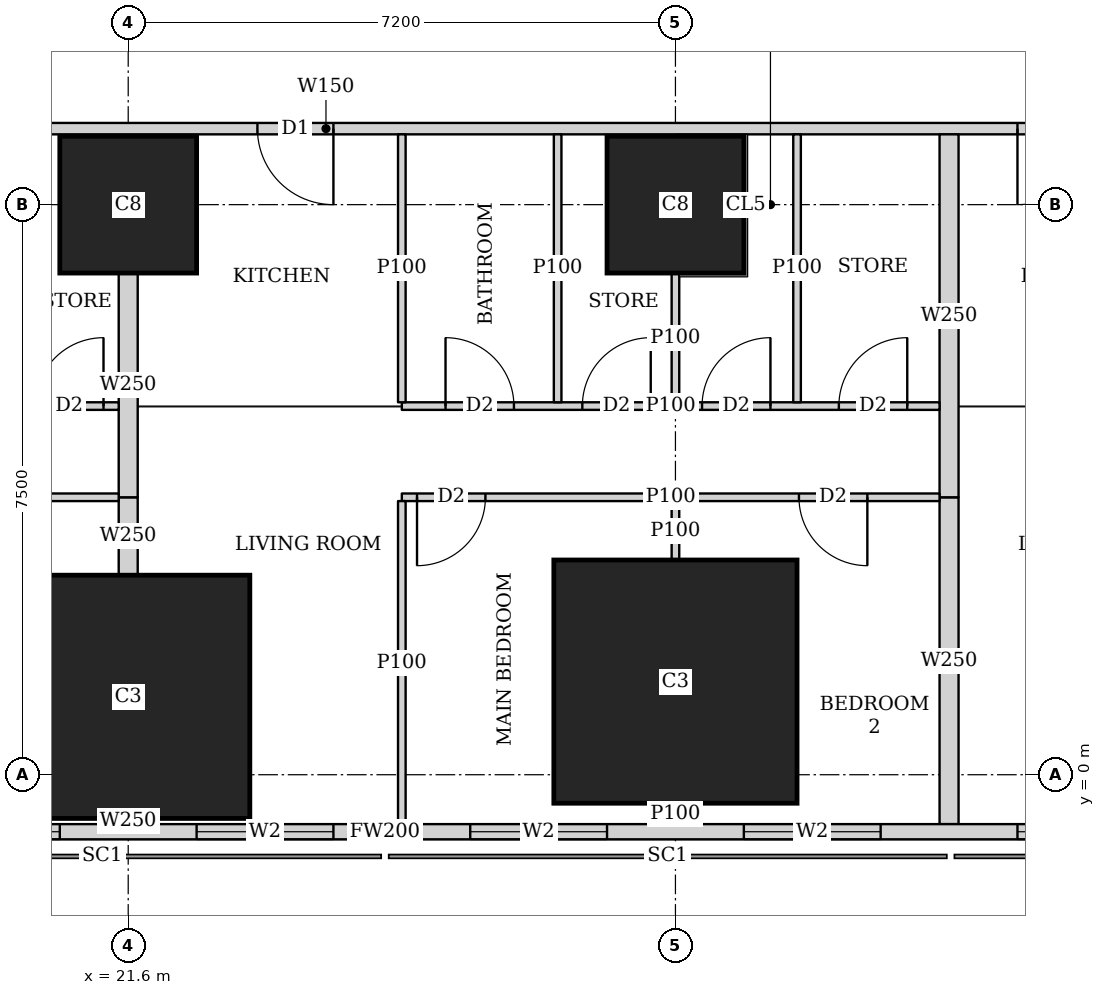
"""IFC4 building model, lengths in metres.
Left out: names, types, materials, properties, quantities, classifications, styles, units other than length and angle.
Written with IfcOpenShell. Run it as: python <this file> out.ifc"""

import sys

from ifc_helpers import new_model, si_unit, direction, frame, frame_2d, origin, origin_2d, place, context, subcontext, project, spatial, rectangle, extrude, element, fill, save


model = new_model("IFC4")
c1 = context("Model", 3, precision=1e-05, world=origin(), true_north=direction((0.0, 1.0)))
c2 = subcontext(c1, "Body", "Model", "MODEL_VIEW")
j1 = project(units=[si_unit("LENGTHUNIT", "METRE"), si_unit("PLANEANGLEUNIT", "RADIAN")], contexts=[c1])
p1 = place(None, origin())
s1 = spatial("IfcSite", under=j1, at=p1, CompositionType="ELEMENT")
p2 = place(p1, origin())
s2 = spatial("IfcBuilding", under=s1, at=p2, CompositionType="ELEMENT")
p3 = place(p2, frame((0.0, 0.0, 20.0)))
s3 = spatial("IfcBuildingStorey", under=s2, at=p3, CompositionType="ELEMENT", Elevation=20.0)
p4 = place(p3, frame((21.6, 1.025, -0.3), z_axis=(0.0, 0.0, 1.0), x_axis=(1.0, 0.0, 0.0)))
e1 = element("IfcColumn", 1, at=p4, inside=s3, PredefinedType="COLUMN", context=c2, shape_type="SweptSolid", body=[
    extrude(rectangle(XDim=3.2, YDim=3.2, at=origin_2d()), origin(), (0.0, 0.0, 1.0), 4.05),
])
p5 = place(p3, frame((28.8, 1.225, 0.0), z_axis=(0.0, 0.0, 1.0), x_axis=(1.0, 0.0, 0.0)))
e2 = element("IfcColumn", 2, at=p5, inside=s3, PredefinedType="COLUMN", context=c2, shape_type="SweptSolid", body=[
    extrude(rectangle(XDim=3.2, YDim=3.2, at=origin_2d()), origin(), (0.0, 0.0, 1.0), 3.75),
])
for number, where, z_axis, x_axis in (
    (3, (21.6, 7.5, 0.0), (0.0, 0.0, 1.0), (1.0, 0.0, 0.0)),
    (4, (28.8, 7.5, 0.0), (0.0, 0.0, 1.0), (1.0, 0.0, 0.0)),
):
    element("IfcColumn", number, at=place(p3, frame(where, z_axis=z_axis, x_axis=x_axis)), inside=s3, PredefinedType="COLUMN", context=c2, shape_type="SweptSolid", body=[
        extrude(rectangle(XDim=1.8, YDim=1.8, at=origin_2d()), origin(), (0.0, 0.0, 1.0), 3.75),
    ])
p6 = place(p3, frame((2.163, -0.75, 0.0), z_axis=(0.0, 0.0, 1.0), x_axis=(1.0, 0.0, 0.0)))
e5 = element("IfcWall", 5, at=p6, inside=s3, PredefinedType="SOLIDWALL", context=c2, shape_type="SweptSolid", body=[
    extrude(rectangle(XDim=45.628, YDim=0.2, at=frame_2d((22.814, 0.0))), origin(), (0.0, 0.0, 1.0), 3.5),
])
p7 = place(p6, frame((9.537, 0.0, 0.9)))
e6 = element("IfcOpeningElement", 6, at=p7, cuts=e5, PredefinedType="OPENING", context=c2, shape_type="SweptSolid", body=[
    extrude(rectangle(XDim=1.8, YDim=1.5, at=frame_2d((0.9, 0.75))), frame((0.0, 0.11, 0.0), z_axis=(0.0, -1.0, 0.0), x_axis=(1.0, 0.0, 0.0)), (0.0, 0.0, 1.0), 0.22),
])
p8 = place(p6, frame((13.137, 0.0, 0.9)))
e7 = element("IfcOpeningElement", 7, at=p8, cuts=e5, PredefinedType="OPENING", context=c2, shape_type="SweptSolid", body=[
    extrude(rectangle(XDim=1.8, YDim=1.5, at=frame_2d((0.9, 0.75))), frame((0.0, 0.11, 0.0), z_axis=(0.0, -1.0, 0.0), x_axis=(1.0, 0.0, 0.0)), (0.0, 0.0, 1.0), 0.22),
])
p9 = place(p6, frame((16.737, 0.0, 0.9)))
e8 = element("IfcOpeningElement", 8, at=p9, cuts=e5, PredefinedType="OPENING", context=c2, shape_type="SweptSolid", body=[
    extrude(rectangle(XDim=1.8, YDim=1.5, at=frame_2d((0.9, 0.75))), frame((0.0, 0.11, 0.0), z_axis=(0.0, -1.0, 0.0), x_axis=(1.0, 0.0, 0.0)), (0.0, 0.0, 1.0), 0.22),
])
p10 = place(p6, frame((20.337, 0.0, 0.9)))
e9 = element("IfcOpeningElement", 9, at=p10, cuts=e5, PredefinedType="OPENING", context=c2, shape_type="SweptSolid", body=[
    extrude(rectangle(XDim=1.8, YDim=1.5, at=frame_2d((0.9, 0.75))), frame((0.0, 0.11, 0.0), z_axis=(0.0, -1.0, 0.0), x_axis=(1.0, 0.0, 0.0)), (0.0, 0.0, 1.0), 0.22),
])
p11 = place(p6, frame((23.937, 0.0, 0.9)))
e10 = element("IfcOpeningElement", 10, at=p11, cuts=e5, PredefinedType="OPENING", context=c2, shape_type="SweptSolid", body=[
    extrude(rectangle(XDim=1.8, YDim=1.5, at=frame_2d((0.9, 0.75))), frame((0.0, 0.11, 0.0), z_axis=(0.0, -1.0, 0.0), x_axis=(1.0, 0.0, 0.0)), (0.0, 0.0, 1.0), 0.22),
])
p12 = place(p6, frame((27.537, 0.0, 0.9)))
e11 = element("IfcOpeningElement", 11, at=p12, cuts=e5, PredefinedType="OPENING", context=c2, shape_type="SweptSolid", body=[
    extrude(rectangle(XDim=1.8, YDim=1.5, at=frame_2d((0.9, 0.75))), frame((0.0, 0.11, 0.0), z_axis=(0.0, -1.0, 0.0), x_axis=(1.0, 0.0, 0.0)), (0.0, 0.0, 1.0), 0.22),
])
p13 = place(p6, frame((31.137, 0.0, 0.9)))
e12 = element("IfcOpeningElement", 12, at=p13, cuts=e5, PredefinedType="OPENING", context=c2, shape_type="SweptSolid", body=[
    extrude(rectangle(XDim=1.8, YDim=1.5, at=frame_2d((0.9, 0.75))), frame((0.0, 0.11, 0.0), z_axis=(0.0, -1.0, 0.0), x_axis=(1.0, 0.0, 0.0)), (0.0, 0.0, 1.0), 0.22),
])
p14 = place(p6, frame((34.737, 0.0, 0.9)))
e13 = element("IfcOpeningElement", 13, at=p14, cuts=e5, PredefinedType="OPENING", context=c2, shape_type="SweptSolid", body=[
    extrude(rectangle(XDim=1.8, YDim=1.5, at=frame_2d((0.9, 0.75))), frame((0.0, 0.11, 0.0), z_axis=(0.0, -1.0, 0.0), x_axis=(1.0, 0.0, 0.0)), (0.0, 0.0, 1.0), 0.22),
])
p15 = place(p3, frame((40.054, 8.5, 0.0), z_axis=(0.0, 0.0, 1.0), x_axis=(-1.0, 0.0, 0.0)))
e14 = element("IfcWall", 14, at=p15, inside=s3, PredefinedType="SOLIDWALL", context=c2, shape_type="SweptSolid", body=[
    extrude(rectangle(XDim=31.704, YDim=0.15, at=frame_2d((15.852, 0.0))), origin(), (0.0, 0.0, 1.0), 3.5),
])
p16 = place(p15, frame((27.321, 0.0, 0.0)))
e15 = element("IfcOpeningElement", 15, at=p16, cuts=e14, PredefinedType="OPENING", context=c2, shape_type="SweptSolid", body=[
    extrude(rectangle(XDim=1.0, YDim=2.1, at=frame_2d((0.5, 1.05))), frame((0.0, 0.085, 0.0), z_axis=(0.0, -1.0, 0.0), x_axis=(1.0, 0.0, 0.0)), (0.0, 0.0, 1.0), 0.17),
])
p17 = place(p15, frame((23.054, 0.0, 0.0)))
e16 = element("IfcOpeningElement", 16, at=p17, cuts=e14, PredefinedType="OPENING", context=c2, shape_type="SweptSolid", body=[
    extrude(rectangle(XDim=1.0, YDim=2.1, at=frame_2d((0.5, 1.05))), frame((0.0, 0.085, 0.0), z_axis=(0.0, -1.0, 0.0), x_axis=(1.0, 0.0, 0.0)), (0.0, 0.0, 1.0), 0.17),
])
p18 = place(p15, frame((15.754, 0.0, 0.0)))
e17 = element("IfcOpeningElement", 17, at=p18, cuts=e14, PredefinedType="OPENING", context=c2, shape_type="SweptSolid", body=[
    extrude(rectangle(XDim=1.0, YDim=2.1, at=frame_2d((0.5, 1.05))), frame((0.0, 0.085, 0.0), z_axis=(0.0, -1.0, 0.0), x_axis=(1.0, 0.0, 0.0)), (0.0, 0.0, 1.0), 0.17),
])
p19 = place(p15, frame((5.754, 0.0, 0.0)))
e18 = element("IfcOpeningElement", 18, at=p19, cuts=e14, PredefinedType="OPENING", context=c2, shape_type="SweptSolid", body=[
    extrude(rectangle(XDim=1.0, YDim=2.1, at=frame_2d((0.5, 1.05))), frame((0.0, 0.085, 0.0), z_axis=(0.0, -1.0, 0.0), x_axis=(1.0, 0.0, 0.0)), (0.0, 0.0, 1.0), 0.17),
])
p20 = place(p3, frame((21.475, 3.65, 0.0), z_axis=(0.0, 0.0, 1.0), x_axis=(-1.0, 0.0, 0.0)))
e19 = element("IfcWall", 19, at=p20, inside=s3, PredefinedType="PARTITIONING", context=c2, shape_type="SweptSolid", body=[
    extrude(rectangle(XDim=3.475, YDim=0.1, at=frame_2d((1.738, 0.0))), origin(), (0.0, 0.0, 1.0), 3.5),
])
p21 = place(p20, frame((2.375, 0.0, 0.0)))
e20 = element("IfcOpeningElement", 20, at=p21, cuts=e19, PredefinedType="OPENING", context=c2, shape_type="SweptSolid", body=[
    extrude(rectangle(XDim=0.9, YDim=2.1, at=frame_2d((0.45, 1.05))), frame((0.0, 0.06, 0.0), z_axis=(0.0, -1.0, 0.0), x_axis=(1.0, 0.0, 0.0)), (0.0, 0.0, 1.0), 0.12),
])
p22 = place(p3, frame((21.475, 4.85, 0.0), z_axis=(0.0, 0.0, 1.0), x_axis=(-1.0, 0.0, 0.0)))
e21 = element("IfcWall", 21, at=p22, inside=s3, PredefinedType="PARTITIONING", context=c2, shape_type="SweptSolid", body=[
    extrude(rectangle(XDim=3.475, YDim=0.1, at=frame_2d((1.738, 0.0))), origin(), (0.0, 0.0, 1.0), 3.5),
])
p23 = place(p22, frame((2.0, 0.0, 0.0)))
e22 = element("IfcOpeningElement", 22, at=p23, cuts=e21, PredefinedType="OPENING", context=c2, shape_type="SweptSolid", body=[
    extrude(rectangle(XDim=0.9, YDim=2.1, at=frame_2d((0.45, 1.05))), frame((0.0, 0.06, 0.0), z_axis=(0.0, -1.0, 0.0), x_axis=(1.0, 0.0, 0.0)), (0.0, 0.0, 1.0), 0.12),
])
p24 = place(p22, frame((0.2, 0.0, 0.0)))
e23 = element("IfcOpeningElement", 23, at=p24, cuts=e21, PredefinedType="OPENING", context=c2, shape_type="SweptSolid", body=[
    extrude(rectangle(XDim=0.9, YDim=2.1, at=frame_2d((0.45, 1.05))), frame((0.0, 0.06, 0.0), z_axis=(0.0, -1.0, 0.0), x_axis=(1.0, 0.0, 0.0)), (0.0, 0.0, 1.0), 0.12),
])
p25 = place(p3, frame((32.275, 3.65, 0.0), z_axis=(0.0, 0.0, 1.0), x_axis=(-1.0, 0.0, 0.0)))
e24 = element("IfcWall", 24, at=p25, inside=s3, PredefinedType="PARTITIONING", context=c2, shape_type="SweptSolid", body=[
    extrude(rectangle(XDim=7.075, YDim=0.1, at=frame_2d((3.538, 0.0))), origin(), (0.0, 0.0, 1.0), 3.5),
])
p26 = place(p25, frame((5.975, 0.0, 0.0)))
e25 = element("IfcOpeningElement", 25, at=p26, cuts=e24, PredefinedType="OPENING", context=c2, shape_type="SweptSolid", body=[
    extrude(rectangle(XDim=0.9, YDim=2.1, at=frame_2d((0.45, 1.05))), frame((0.0, 0.06, 0.0), z_axis=(0.0, -1.0, 0.0), x_axis=(1.0, 0.0, 0.0)), (0.0, 0.0, 1.0), 0.12),
])
p27 = place(p25, frame((0.95, 0.0, 0.0)))
e26 = element("IfcOpeningElement", 26, at=p27, cuts=e24, PredefinedType="OPENING", context=c2, shape_type="SweptSolid", body=[
    extrude(rectangle(XDim=0.9, YDim=2.1, at=frame_2d((0.45, 1.05))), frame((0.0, 0.06, 0.0), z_axis=(0.0, -1.0, 0.0), x_axis=(1.0, 0.0, 0.0)), (0.0, 0.0, 1.0), 0.12),
])
p28 = place(p3, frame((32.275, 4.85, 0.0), z_axis=(0.0, 0.0, 1.0), x_axis=(-1.0, 0.0, 0.0)))
e27 = element("IfcWall", 27, at=p28, inside=s3, PredefinedType="PARTITIONING", context=c2, shape_type="SweptSolid", body=[
    extrude(rectangle(XDim=7.075, YDim=0.1, at=frame_2d((3.538, 0.0))), origin(), (0.0, 0.0, 1.0), 3.5),
])
p29 = place(p28, frame((5.6, 0.0, 0.0)))
e28 = element("IfcOpeningElement", 28, at=p29, cuts=e27, PredefinedType="OPENING", context=c2, shape_type="SweptSolid", body=[
    extrude(rectangle(XDim=0.9, YDim=2.1, at=frame_2d((0.45, 1.05))), frame((0.0, 0.06, 0.0), z_axis=(0.0, -1.0, 0.0), x_axis=(1.0, 0.0, 0.0)), (0.0, 0.0, 1.0), 0.12),
])
p30 = place(p28, frame((2.225, 0.0, 0.0)))
e29 = element("IfcOpeningElement", 29, at=p30, cuts=e27, PredefinedType="OPENING", context=c2, shape_type="SweptSolid", body=[
    extrude(rectangle(XDim=0.9, YDim=2.1, at=frame_2d((0.45, 1.05))), frame((0.0, 0.06, 0.0), z_axis=(0.0, -1.0, 0.0), x_axis=(1.0, 0.0, 0.0)), (0.0, 0.0, 1.0), 0.12),
])
p31 = place(p28, frame((3.8, 0.0, 0.0)))
e30 = element("IfcOpeningElement", 30, at=p31, cuts=e27, PredefinedType="OPENING", context=c2, shape_type="SweptSolid", body=[
    extrude(rectangle(XDim=0.9, YDim=2.1, at=frame_2d((0.45, 1.05))), frame((0.0, 0.06, 0.0), z_axis=(0.0, -1.0, 0.0), x_axis=(1.0, 0.0, 0.0)), (0.0, 0.0, 1.0), 0.12),
])
p32 = place(p28, frame((0.425, 0.0, 0.0)))
e31 = element("IfcOpeningElement", 31, at=p32, cuts=e27, PredefinedType="OPENING", context=c2, shape_type="SweptSolid", body=[
    extrude(rectangle(XDim=0.9, YDim=2.1, at=frame_2d((0.45, 1.05))), frame((0.0, 0.06, 0.0), z_axis=(0.0, -1.0, 0.0), x_axis=(1.0, 0.0, 0.0)), (0.0, 0.0, 1.0), 0.12),
])
p33 = place(p3, frame((25.2, -0.65, 0.0), z_axis=(0.0, 0.0, 1.0), x_axis=(0.0, 1.0, 0.0)))
e32 = element("IfcWall", 32, at=p33, inside=s3, PredefinedType="PARTITIONING", context=c2, shape_type="SweptSolid", body=[
    extrude(rectangle(XDim=4.25, YDim=0.1, at=frame_2d((2.125, 0.0))), origin(), (0.0, 0.0, 1.0), 2.05),
])
p34 = place(p3, frame((28.8, -0.65, 0.0), z_axis=(0.0, 0.0, 1.0), x_axis=(0.0, 1.0, 0.0)))
e33 = element("IfcWall", 33, at=p34, inside=s3, PredefinedType="PARTITIONING", context=c2, shape_type="SweptSolid", body=[
    extrude(rectangle(XDim=0.274, YDim=0.1, at=frame_2d((0.137, 0.0))), origin(), (0.0, 0.0, 1.0), 3.5),
])
p35 = place(p3, frame((28.8, 2.826, 0.0), z_axis=(0.0, 0.0, 1.0), x_axis=(0.0, 1.0, 0.0)))
e34 = element("IfcWall", 34, at=p35, inside=s3, PredefinedType="PARTITIONING", context=c2, shape_type="SweptSolid", body=[
    extrude(rectangle(XDim=0.774, YDim=0.1, at=frame_2d((0.387, 0.0))), origin(), (0.0, 0.0, 1.0), 3.5),
])
p36 = place(p3, frame((25.2, 4.9, 0.0), z_axis=(0.0, 0.0, 1.0), x_axis=(0.0, 1.0, 0.0)))
e35 = element("IfcWall", 35, at=p36, inside=s3, PredefinedType="PARTITIONING", context=c2, shape_type="SweptSolid", body=[
    extrude(rectangle(XDim=3.525, YDim=0.1, at=frame_2d((1.763, 0.0))), origin(), (0.0, 0.0, 1.0), 3.5),
])
p37 = place(p3, frame((28.8, 4.9, 0.0), z_axis=(0.0, 0.0, 1.0), x_axis=(0.0, 1.0, 0.0)))
e36 = element("IfcWall", 36, at=p37, inside=s3, PredefinedType="PARTITIONING", context=c2, shape_type="SweptSolid", body=[
    extrude(rectangle(XDim=1.699, YDim=0.1, at=frame_2d((0.85, 0.0))), origin(), (0.0, 0.0, 1.0), 3.5),
])
for number, where, z_axis, x_axis in (
    (37, (27.25, 4.9, 0.0), (0.0, 0.0, 1.0), (0.0, 1.0, 0.0)),
    (38, (30.4, 4.9, 0.0), (0.0, 0.0, 1.0), (0.0, 1.0, 0.0)),
):
    element("IfcWall", number, at=place(p3, frame(where, z_axis=z_axis, x_axis=x_axis)), inside=s3, PredefinedType="PARTITIONING", context=c2, shape_type="SweptSolid", body=[
        extrude(rectangle(XDim=3.525, YDim=0.1, at=frame_2d((1.763, 0.0))), origin(), (0.0, 0.0, 1.0), 3.5),
    ])
p38 = place(p3, frame((21.6, -0.65, 0.0), z_axis=(0.0, 0.0, 1.0), x_axis=(0.0, 1.0, 0.0)))
e39 = element("IfcWall", 39, at=p38, inside=s3, PredefinedType="SOLIDWALL", context=c2, shape_type="SweptSolid", body=[
    extrude(rectangle(XDim=0.074, YDim=0.25, at=frame_2d((0.037, 0.0))), origin(), (0.0, 0.0, 1.0), 2.05),
])
p39 = place(p3, frame((21.6, 2.626, 0.0), z_axis=(0.0, 0.0, 1.0), x_axis=(0.0, 1.0, 0.0)))
e40 = element("IfcWall", 40, at=p39, inside=s3, PredefinedType="SOLIDWALL", context=c2, shape_type="SweptSolid", body=[
    extrude(rectangle(XDim=1.024, YDim=0.25, at=frame_2d((0.512, 0.0))), origin(), (0.0, 0.0, 1.0), 2.05),
])
p40 = place(p3, frame((21.6, 3.65, 0.0), z_axis=(0.0, 0.0, 1.0), x_axis=(0.0, 1.0, 0.0)))
e41 = element("IfcWall", 41, at=p40, inside=s3, PredefinedType="SOLIDWALL", context=c2, shape_type="SweptSolid", body=[
    extrude(rectangle(XDim=2.949, YDim=0.25, at=frame_2d((1.475, 0.0))), origin(), (0.0, 0.0, 1.0), 3.5),
])
p41 = place(p3, frame((32.4, -0.65, 0.0), z_axis=(0.0, 0.0, 1.0), x_axis=(0.0, 1.0, 0.0)))
e42 = element("IfcWall", 42, at=p41, inside=s3, PredefinedType="SOLIDWALL", context=c2, shape_type="SweptSolid", body=[
    extrude(rectangle(XDim=4.3, YDim=0.25, at=frame_2d((2.15, 0.0))), origin(), (0.0, 0.0, 1.0), 2.05),
])
p42 = place(p3, frame((32.4, 3.65, 0.0), z_axis=(0.0, 0.0, 1.0), x_axis=(0.0, 1.0, 0.0)))
e43 = element("IfcWall", 43, at=p42, inside=s3, PredefinedType="SOLIDWALL", context=c2, shape_type="SweptSolid", body=[
    extrude(rectangle(XDim=4.775, YDim=0.25, at=frame_2d((2.388, 0.0))), origin(), (0.0, 0.0, 1.0), 3.5),
])
p43 = place(p9, origin())
e44 = element("IfcWindow", 44, at=p43, inside=s3, PartitioningType="SINGLE_PANEL", PredefinedType="WINDOW", context=c2, shape_type="SweptSolid", body=[
    extrude(rectangle(XDim=1.8, YDim=1.5, at=frame_2d((0.9, 0.75))), frame((0.0, 0.03, 0.0), z_axis=(0.0, -1.0, 0.0), x_axis=(1.0, 0.0, 0.0)), (0.0, 0.0, 1.0), 0.06),
])
fill(e8, e44)
p44 = place(p10, origin())
e45 = element("IfcWindow", 45, at=p44, inside=s3, PartitioningType="SINGLE_PANEL", PredefinedType="WINDOW", context=c2, shape_type="SweptSolid", body=[
    extrude(rectangle(XDim=1.8, YDim=1.5, at=frame_2d((0.9, 0.75))), frame((0.0, 0.03, 0.0), z_axis=(0.0, -1.0, 0.0), x_axis=(1.0, 0.0, 0.0)), (0.0, 0.0, 1.0), 0.06),
])
fill(e9, e45)
p45 = place(p11, origin())
e46 = element("IfcWindow", 46, at=p45, inside=s3, PartitioningType="SINGLE_PANEL", PredefinedType="WINDOW", context=c2, shape_type="SweptSolid", body=[
    extrude(rectangle(XDim=1.8, YDim=1.5, at=frame_2d((0.9, 0.75))), frame((0.0, 0.03, 0.0), z_axis=(0.0, -1.0, 0.0), x_axis=(1.0, 0.0, 0.0)), (0.0, 0.0, 1.0), 0.06),
])
fill(e10, e46)
p46 = place(p12, origin())
e47 = element("IfcWindow", 47, at=p46, inside=s3, PartitioningType="SINGLE_PANEL", PredefinedType="WINDOW", context=c2, shape_type="SweptSolid", body=[
    extrude(rectangle(XDim=1.8, YDim=1.5, at=frame_2d((0.9, 0.75))), frame((0.0, 0.03, 0.0), z_axis=(0.0, -1.0, 0.0), x_axis=(1.0, 0.0, 0.0)), (0.0, 0.0, 1.0), 0.06),
])
fill(e11, e47)
p47 = place(p13, origin())
e48 = element("IfcWindow", 48, at=p47, inside=s3, PartitioningType="SINGLE_PANEL", PredefinedType="WINDOW", context=c2, shape_type="SweptSolid", body=[
    extrude(rectangle(XDim=1.8, YDim=1.5, at=frame_2d((0.9, 0.75))), frame((0.0, 0.03, 0.0), z_axis=(0.0, -1.0, 0.0), x_axis=(1.0, 0.0, 0.0)), (0.0, 0.0, 1.0), 0.06),
])
fill(e12, e48)
p48 = place(p24, origin())
e49 = element("IfcDoor", 49, at=p48, inside=s3, OperationType="SINGLE_SWING_RIGHT", PredefinedType="DOOR", context=c2, shape_type="SweptSolid", body=[
    extrude(rectangle(XDim=0.9, YDim=2.1, at=frame_2d((0.45, 1.05))), frame((0.0, 0.025, 0.0), z_axis=(0.0, -1.0, 0.0), x_axis=(1.0, 0.0, 0.0)), (0.0, 0.0, 1.0), 0.05),
])
fill(e23, e49)
p49 = place(p26, origin())
e50 = element("IfcDoor", 50, at=p49, inside=s3, OperationType="SINGLE_SWING_RIGHT", PredefinedType="DOOR", context=c2, shape_type="SweptSolid", body=[
    extrude(rectangle(XDim=0.9, YDim=2.1, at=frame_2d((0.45, 1.05))), frame((0.0, 0.025, 0.0), z_axis=(0.0, -1.0, 0.0), x_axis=(1.0, 0.0, 0.0)), (0.0, 0.0, 1.0), 0.05),
])
fill(e25, e50)
p50 = place(p27, origin())
e51 = element("IfcDoor", 51, at=p50, inside=s3, OperationType="SINGLE_SWING_LEFT", PredefinedType="DOOR", context=c2, shape_type="SweptSolid", body=[
    extrude(rectangle(XDim=0.9, YDim=2.1, at=frame_2d((0.45, 1.05))), frame((0.0, 0.025, 0.0), z_axis=(0.0, -1.0, 0.0), x_axis=(1.0, 0.0, 0.0)), (0.0, 0.0, 1.0), 0.05),
])
fill(e26, e51)
p51 = place(p29, origin())
e52 = element("IfcDoor", 52, at=p51, inside=s3, OperationType="SINGLE_SWING_LEFT", PredefinedType="DOOR", context=c2, shape_type="SweptSolid", body=[
    extrude(rectangle(XDim=0.9, YDim=2.1, at=frame_2d((0.45, 1.05))), frame((0.0, 0.025, 0.0), z_axis=(0.0, -1.0, 0.0), x_axis=(1.0, 0.0, 0.0)), (0.0, 0.0, 1.0), 0.05),
])
fill(e28, e52)
p52 = place(p30, origin())
e53 = element("IfcDoor", 53, at=p52, inside=s3, OperationType="SINGLE_SWING_RIGHT", PredefinedType="DOOR", context=c2, shape_type="SweptSolid", body=[
    extrude(rectangle(XDim=0.9, YDim=2.1, at=frame_2d((0.45, 1.05))), frame((0.0, 0.025, 0.0), z_axis=(0.0, -1.0, 0.0), x_axis=(1.0, 0.0, 0.0)), (0.0, 0.0, 1.0), 0.05),
])
fill(e29, e53)
p53 = place(p31, origin())
e54 = element("IfcDoor", 54, at=p53, inside=s3, OperationType="SINGLE_SWING_RIGHT", PredefinedType="DOOR", context=c2, shape_type="SweptSolid", body=[
    extrude(rectangle(XDim=0.9, YDim=2.1, at=frame_2d((0.45, 1.05))), frame((0.0, 0.025, 0.0), z_axis=(0.0, -1.0, 0.0), x_axis=(1.0, 0.0, 0.0)), (0.0, 0.0, 1.0), 0.05),
])
fill(e30, e54)
p54 = place(p32, origin())
e55 = element("IfcDoor", 55, at=p54, inside=s3, OperationType="SINGLE_SWING_RIGHT", PredefinedType="DOOR", context=c2, shape_type="SweptSolid", body=[
    extrude(rectangle(XDim=0.9, YDim=2.1, at=frame_2d((0.45, 1.05))), frame((0.0, 0.025, 0.0), z_axis=(0.0, -1.0, 0.0), x_axis=(1.0, 0.0, 0.0)), (0.0, 0.0, 1.0), 0.05),
])
fill(e31, e55)
p55 = place(p18, origin())
e56 = element("IfcDoor", 56, at=p55, inside=s3, OperationType="SINGLE_SWING_LEFT", PredefinedType="DOOR", context=c2, shape_type="SweptSolid", body=[
    extrude(rectangle(XDim=1.0, YDim=2.1, at=frame_2d((0.5, 1.05))), frame((0.0, 0.025, 0.0), z_axis=(0.0, -1.0, 0.0), x_axis=(1.0, 0.0, 0.0)), (0.0, 0.0, 1.0), 0.05),
])
fill(e17, e56)
p56 = place(p19, origin())
e57 = element("IfcDoor", 57, at=p56, inside=s3, OperationType="SINGLE_SWING_RIGHT", PredefinedType="DOOR", context=c2, shape_type="SweptSolid", body=[
    extrude(rectangle(XDim=1.0, YDim=2.1, at=frame_2d((0.5, 1.05))), frame((0.0, 0.025, 0.0), z_axis=(0.0, -1.0, 0.0), x_axis=(1.0, 0.0, 0.0)), (0.0, 0.0, 1.0), 0.05),
])
fill(e18, e57)
save(model, sys.argv[1])
